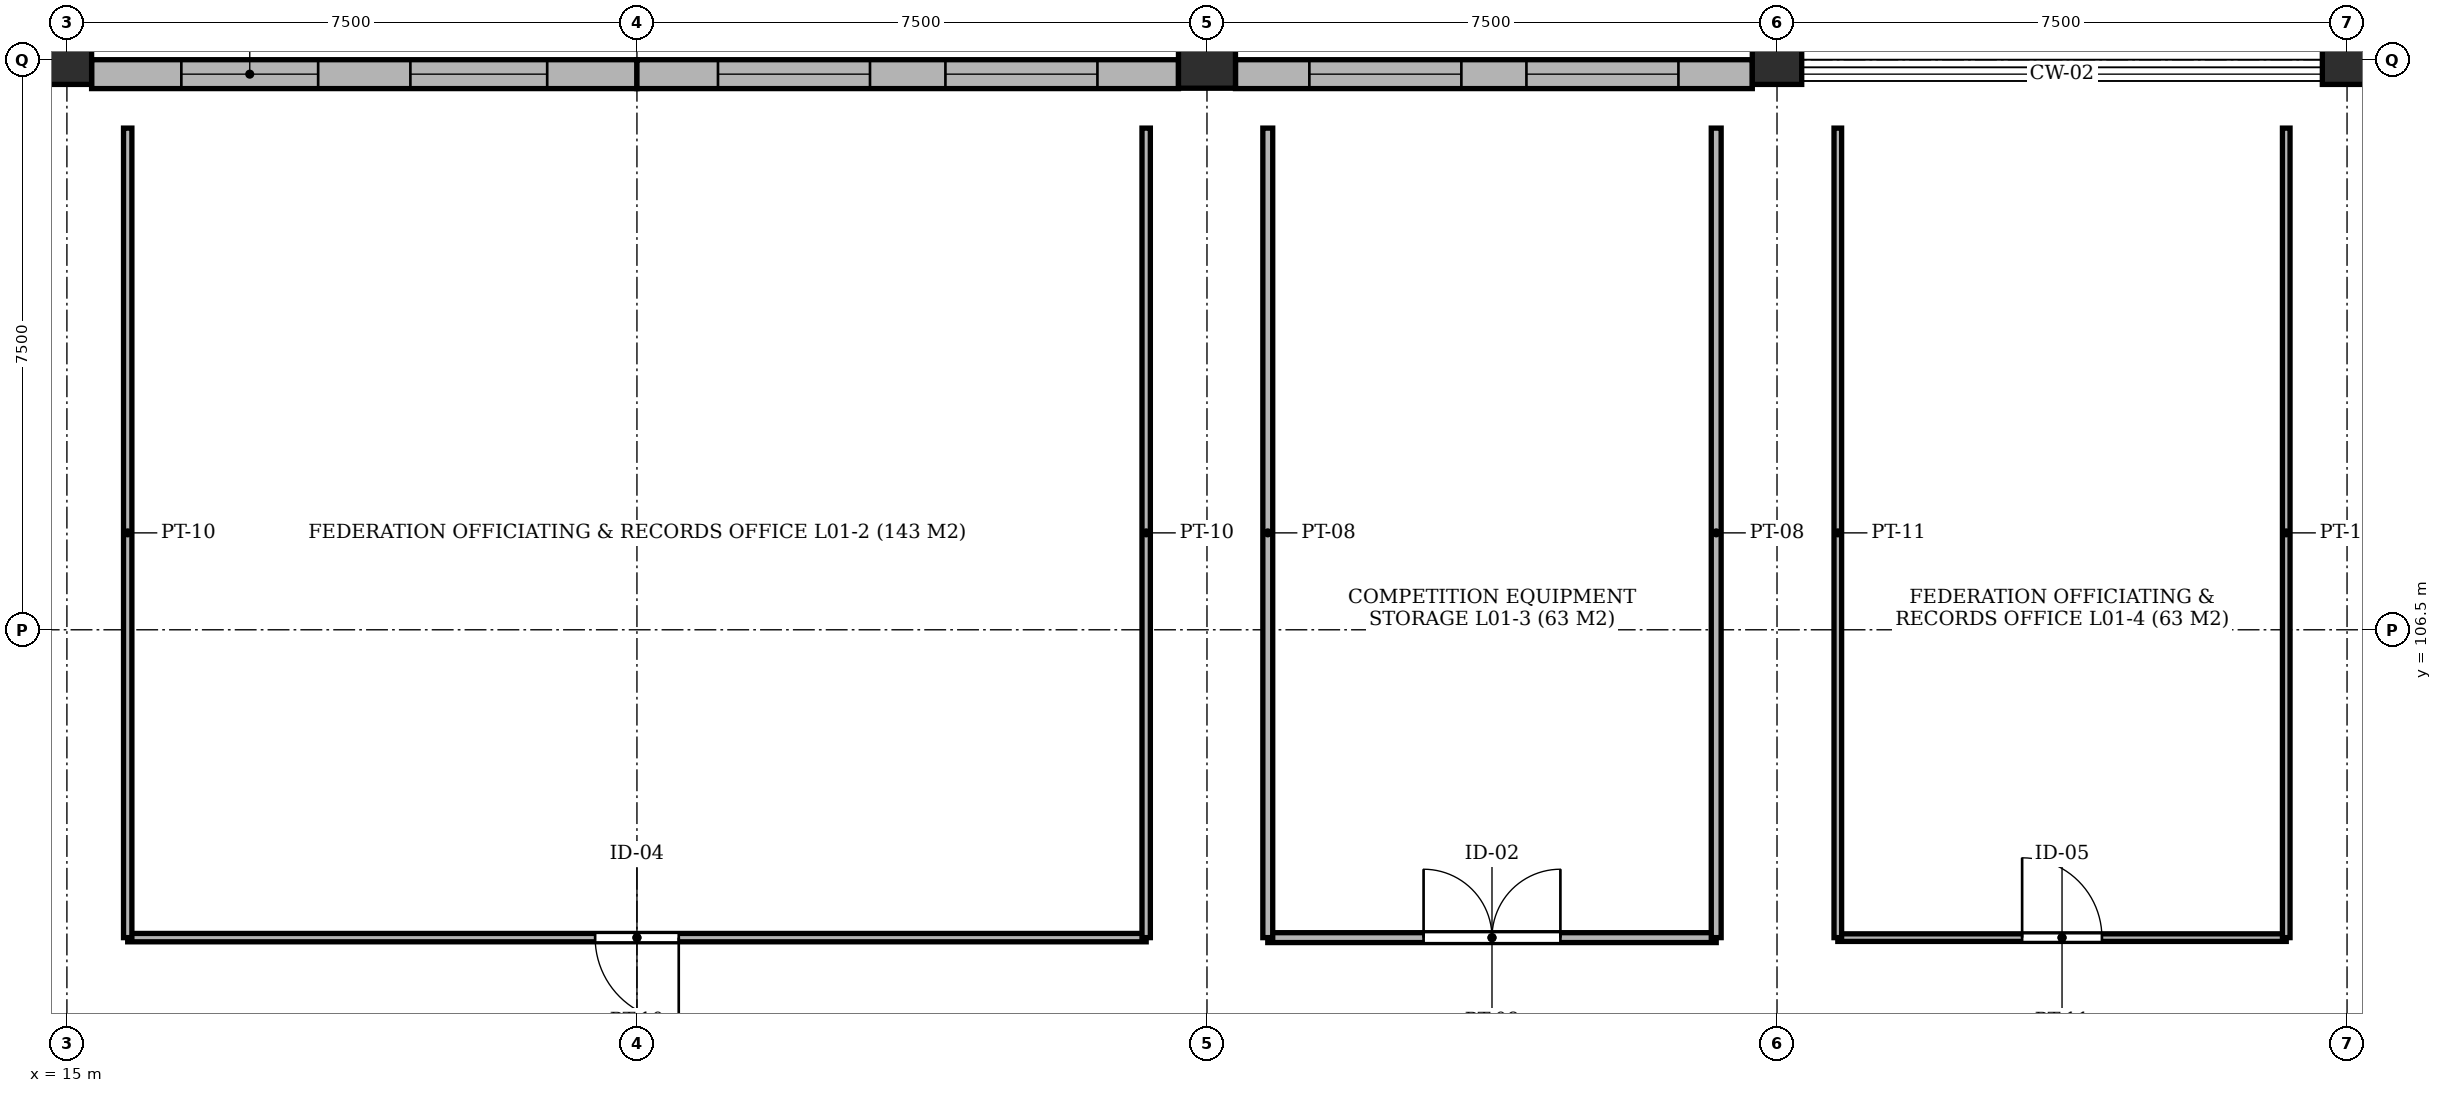
"""IFC4 building model, lengths in metres.
Left out: names, types, materials, properties, quantities, classifications, styles, units other than length and angle.
Written with IfcOpenShell. Run it as: python <this file> out.ifc"""

import sys

from ifc_helpers import new_model, si_unit, direction, frame, frame_2d, origin, origin_2d, place, context, subcontext, project, spatial, rectangle, extrude, element, fill, save


model = new_model("IFC4")
c1 = context("Model", 3, precision=1e-05, world=origin(), true_north=direction((0.0, 1.0)))
c2 = subcontext(c1, "Body", "Model", "MODEL_VIEW")
j1 = project(units=[si_unit("LENGTHUNIT", "METRE"), si_unit("PLANEANGLEUNIT", "RADIAN")], contexts=[c1])
p1 = place(None, origin())
s1 = spatial("IfcSite", under=j1, at=p1, CompositionType="ELEMENT")
p2 = place(p1, origin())
s2 = spatial("IfcBuilding", under=s1, at=p2, CompositionType="ELEMENT")
p3 = place(p2, frame((0.0, 0.0, 4.6)))
s3 = spatial("IfcBuildingStorey", under=s2, at=p3, CompositionType="ELEMENT", Elevation=4.6)
p4 = place(p3, frame((15.0, 114.0, -0.3), z_axis=(0.0, 0.0, 1.0), x_axis=(1.0, 0.0, 0.0)))
e1 = element("IfcColumn", 1, at=p4, inside=s3, PredefinedType="COLUMN", context=c2, shape_type="SweptSolid", body=[
    extrude(rectangle(XDim=0.65, YDim=0.65, at=origin_2d()), origin(), (0.0, 0.0, 1.0), 4.65),
])
p5 = place(p3, frame((30.0, 114.0, -0.3), z_axis=(0.0, 0.0, 1.0), x_axis=(1.0, 0.0, 0.0)))
e2 = element("IfcColumn", 2, at=p5, inside=s3, PredefinedType="COLUMN", context=c2, shape_type="SweptSolid", body=[
    extrude(rectangle(XDim=0.75, YDim=0.75, at=origin_2d()), origin(), (0.0, 0.0, 1.0), 4.65),
])
for number, where, z_axis, x_axis in (
    (3, (37.5, 114.0, -0.3), (0.0, 0.0, 1.0), (1.0, 0.0, 0.0)),
    (4, (45.0, 114.0, -0.3), (0.0, 0.0, 1.0), (1.0, 0.0, 0.0)),
):
    element("IfcColumn", number, at=place(p3, frame(where, z_axis=z_axis, x_axis=x_axis)), inside=s3, PredefinedType="COLUMN", context=c2, shape_type="SweptSolid", body=[
        extrude(rectangle(XDim=0.65, YDim=0.65, at=origin_2d()), origin(), (0.0, 0.0, 1.0), 4.65),
    ])
p6 = place(p3, frame((22.5, 113.81, 0.0), z_axis=(0.0, 0.0, 1.0), x_axis=(-1.0, 0.0, 0.0)))
e5 = element("IfcWall", 5, at=p6, inside=s3, PredefinedType="SOLIDWALL", context=c2, shape_type="SweptSolid", body=[
    extrude(rectangle(XDim=7.175, YDim=0.38, at=frame_2d((3.587, 0.0))), origin(), (0.0, 0.0, 1.0), 3.65),
])
p7 = place(p6, frame((4.194, 0.0, 0.92)))
e6 = element("IfcOpeningElement", 6, at=p7, cuts=e5, PredefinedType="OPENING", context=c2, shape_type="SweptSolid", body=[
    extrude(rectangle(XDim=1.8, YDim=2.3, at=frame_2d((0.9, 1.15))), frame((0.0, 0.202, 0.0), z_axis=(0.0, -1.0, 0.0), x_axis=(1.0, 0.0, 0.0)), (0.0, 0.0, 1.0), 0.404),
])
p8 = place(p6, frame((1.181, 0.0, 0.92)))
e7 = element("IfcOpeningElement", 7, at=p8, cuts=e5, PredefinedType="OPENING", context=c2, shape_type="SweptSolid", body=[
    extrude(rectangle(XDim=1.8, YDim=2.3, at=frame_2d((0.9, 1.15))), frame((0.0, 0.202, 0.0), z_axis=(0.0, -1.0, 0.0), x_axis=(1.0, 0.0, 0.0)), (0.0, 0.0, 1.0), 0.404),
])
p9 = place(p3, frame((29.625, 113.81, 0.0), z_axis=(0.0, 0.0, 1.0), x_axis=(-1.0, 0.0, 0.0)))
e8 = element("IfcWall", 8, at=p9, inside=s3, PredefinedType="SOLIDWALL", context=c2, shape_type="SweptSolid", body=[
    extrude(rectangle(XDim=7.125, YDim=0.38, at=frame_2d((3.562, 0.0))), origin(), (0.0, 0.0, 1.0), 3.65),
])
p10 = place(p9, frame((4.059, 0.0, 0.92)))
e9 = element("IfcOpeningElement", 9, at=p10, cuts=e8, PredefinedType="OPENING", context=c2, shape_type="SweptSolid", body=[
    extrude(rectangle(XDim=2.0, YDim=2.3, at=frame_2d((1.0, 1.15))), frame((0.0, 0.202, 0.0), z_axis=(0.0, -1.0, 0.0), x_axis=(1.0, 0.0, 0.0)), (0.0, 0.0, 1.0), 0.404),
])
p11 = place(p9, frame((1.066, 0.0, 0.92)))
e10 = element("IfcOpeningElement", 10, at=p11, cuts=e8, PredefinedType="OPENING", context=c2, shape_type="SweptSolid", body=[
    extrude(rectangle(XDim=2.0, YDim=2.3, at=frame_2d((1.0, 1.15))), frame((0.0, 0.202, 0.0), z_axis=(0.0, -1.0, 0.0), x_axis=(1.0, 0.0, 0.0)), (0.0, 0.0, 1.0), 0.404),
])
p12 = place(p3, frame((37.175, 113.81, 0.0), z_axis=(0.0, 0.0, 1.0), x_axis=(-1.0, 0.0, 0.0)))
e11 = element("IfcWall", 11, at=p12, inside=s3, PredefinedType="SOLIDWALL", context=c2, shape_type="SweptSolid", body=[
    extrude(rectangle(XDim=6.8, YDim=0.38, at=frame_2d((3.4, 0.0))), origin(), (0.0, 0.0, 1.0), 4.02),
])
p13 = place(p12, frame((3.828, 0.0, 0.92)))
e12 = element("IfcOpeningElement", 12, at=p13, cuts=e11, PredefinedType="OPENING", context=c2, shape_type="SweptSolid", body=[
    extrude(rectangle(XDim=2.0, YDim=2.3, at=frame_2d((1.0, 1.15))), frame((0.0, 0.202, 0.0), z_axis=(0.0, -1.0, 0.0), x_axis=(1.0, 0.0, 0.0)), (0.0, 0.0, 1.0), 0.404),
])
p14 = place(p12, frame((0.972, 0.0, 0.92)))
e13 = element("IfcOpeningElement", 13, at=p14, cuts=e11, PredefinedType="OPENING", context=c2, shape_type="SweptSolid", body=[
    extrude(rectangle(XDim=2.0, YDim=2.3, at=frame_2d((1.0, 1.15))), frame((0.0, 0.202, 0.0), z_axis=(0.0, -1.0, 0.0), x_axis=(1.0, 0.0, 0.0)), (0.0, 0.0, 1.0), 0.404),
])
p15 = place(p3, frame((15.8, 102.45, 0.0), z_axis=(0.0, 0.0, 1.0), x_axis=(1.0, 0.0, 0.0)))
e14 = element("IfcWall", 14, at=p15, inside=s3, PredefinedType="PARTITIONING", context=c2, shape_type="SweptSolid", body=[
    extrude(rectangle(XDim=13.4, YDim=0.11, at=frame_2d((6.7, 0.0))), origin(), (0.0, 0.0, 1.0), 4.08),
])
p16 = place(p15, frame((6.15, 0.0, 0.0)))
e15 = element("IfcOpeningElement", 15, at=p16, cuts=e14, PredefinedType="OPENING", context=c2, shape_type="SweptSolid", body=[
    extrude(rectangle(XDim=1.1, YDim=2.15, at=frame_2d((0.55, 1.075))), frame((0.0, 0.067, 0.0), z_axis=(0.0, -1.0, 0.0), x_axis=(1.0, 0.0, 0.0)), (0.0, 0.0, 1.0), 0.134),
])
for number, where, z_axis, x_axis in (
    (16, (15.8, 102.45, 0.0), (0.0, 0.0, 1.0), (0.0, 1.0, 0.0)),
    (17, (29.2, 102.45, 0.0), (0.0, 0.0, 1.0), (0.0, 1.0, 0.0)),
):
    element("IfcWall", number, at=place(p3, frame(where, z_axis=z_axis, x_axis=x_axis)), inside=s3, PredefinedType="PARTITIONING", context=c2, shape_type="SweptSolid", body=[
        extrude(rectangle(XDim=10.65, YDim=0.11, at=frame_2d((5.325, 0.0))), origin(), (0.0, 0.0, 1.0), 4.08),
    ])
p17 = place(p3, frame((30.8, 102.45, 0.0), z_axis=(0.0, 0.0, 1.0), x_axis=(1.0, 0.0, 0.0)))
e18 = element("IfcWall", 18, at=p17, inside=s3, PredefinedType="PARTITIONING", context=c2, shape_type="SweptSolid", body=[
    extrude(rectangle(XDim=5.9, YDim=0.13, at=frame_2d((2.95, 0.0))), origin(), (0.0, 0.0, 1.0), 4.08),
])
p18 = place(p17, frame((2.05, 0.0, 0.0)))
e19 = element("IfcOpeningElement", 19, at=p18, cuts=e18, PredefinedType="OPENING", context=c2, shape_type="SweptSolid", body=[
    extrude(rectangle(XDim=1.8, YDim=2.25, at=frame_2d((0.9, 1.125))), frame((0.0, 0.077, 0.0), z_axis=(0.0, -1.0, 0.0), x_axis=(1.0, 0.0, 0.0)), (0.0, 0.0, 1.0), 0.154),
])
for number, where, z_axis, x_axis in (
    (20, (30.8, 102.45, 0.0), (0.0, 0.0, 1.0), (0.0, 1.0, 0.0)),
    (21, (36.7, 102.45, 0.0), (0.0, 0.0, 1.0), (0.0, 1.0, 0.0)),
):
    element("IfcWall", number, at=place(p3, frame(where, z_axis=z_axis, x_axis=x_axis)), inside=s3, PredefinedType="PARTITIONING", context=c2, shape_type="SweptSolid", body=[
        extrude(rectangle(XDim=10.65, YDim=0.13, at=frame_2d((5.325, 0.0))), origin(), (0.0, 0.0, 1.0), 4.08),
    ])
p19 = place(p3, frame((38.3, 102.45, 0.0), z_axis=(0.0, 0.0, 1.0), x_axis=(1.0, 0.0, 0.0)))
e22 = element("IfcWall", 22, at=p19, inside=s3, PredefinedType="PARTITIONING", context=c2, shape_type="SweptSolid", body=[
    extrude(rectangle(XDim=5.9, YDim=0.1, at=frame_2d((2.95, 0.0))), origin(), (0.0, 0.0, 1.0), 4.08),
])
p20 = place(p19, frame((2.425, 0.0, 0.0)))
e23 = element("IfcOpeningElement", 23, at=p20, cuts=e22, PredefinedType="OPENING", context=c2, shape_type="SweptSolid", body=[
    extrude(rectangle(XDim=1.05, YDim=2.15, at=frame_2d((0.525, 1.075))), frame((0.0, 0.062, 0.0), z_axis=(0.0, -1.0, 0.0), x_axis=(1.0, 0.0, 0.0)), (0.0, 0.0, 1.0), 0.124),
])
for number, where, z_axis, x_axis in (
    (24, (38.3, 102.45, 0.0), (0.0, 0.0, 1.0), (0.0, 1.0, 0.0)),
    (25, (44.2, 102.45, 0.0), (0.0, 0.0, 1.0), (0.0, 1.0, 0.0)),
):
    element("IfcWall", number, at=place(p3, frame(where, z_axis=z_axis, x_axis=x_axis)), inside=s3, PredefinedType="PARTITIONING", context=c2, shape_type="SweptSolid", body=[
        extrude(rectangle(XDim=10.65, YDim=0.1, at=frame_2d((5.325, 0.0))), origin(), (0.0, 0.0, 1.0), 4.08),
    ])
p21 = place(p7, origin())
e26 = element("IfcWindow", 26, at=p21, inside=s3, PartitioningType="SINGLE_PANEL", PredefinedType="WINDOW", context=c2, shape_type="SweptSolid", body=[
    extrude(rectangle(XDim=1.8, YDim=2.3, at=frame_2d((0.9, 1.15))), frame((0.0, 0.03, 0.0), z_axis=(0.0, -1.0, 0.0), x_axis=(1.0, 0.0, 0.0)), (0.0, 0.0, 1.0), 0.06),
])
fill(e6, e26)
p22 = place(p8, origin())
e27 = element("IfcWindow", 27, at=p22, inside=s3, PartitioningType="SINGLE_PANEL", PredefinedType="WINDOW", context=c2, shape_type="SweptSolid", body=[
    extrude(rectangle(XDim=1.8, YDim=2.3, at=frame_2d((0.9, 1.15))), frame((0.0, 0.03, 0.0), z_axis=(0.0, -1.0, 0.0), x_axis=(1.0, 0.0, 0.0)), (0.0, 0.0, 1.0), 0.06),
])
fill(e7, e27)
p23 = place(p10, origin())
e28 = element("IfcWindow", 28, at=p23, inside=s3, PartitioningType="SINGLE_PANEL", PredefinedType="WINDOW", context=c2, shape_type="SweptSolid", body=[
    extrude(rectangle(XDim=2.0, YDim=2.3, at=frame_2d((1.0, 1.15))), frame((0.0, 0.03, 0.0), z_axis=(0.0, -1.0, 0.0), x_axis=(1.0, 0.0, 0.0)), (0.0, 0.0, 1.0), 0.06),
])
fill(e9, e28)
p24 = place(p11, origin())
e29 = element("IfcWindow", 29, at=p24, inside=s3, PartitioningType="SINGLE_PANEL", PredefinedType="WINDOW", context=c2, shape_type="SweptSolid", body=[
    extrude(rectangle(XDim=2.0, YDim=2.3, at=frame_2d((1.0, 1.15))), frame((0.0, 0.03, 0.0), z_axis=(0.0, -1.0, 0.0), x_axis=(1.0, 0.0, 0.0)), (0.0, 0.0, 1.0), 0.06),
])
fill(e10, e29)
p25 = place(p13, origin())
e30 = element("IfcWindow", 30, at=p25, inside=s3, PartitioningType="SINGLE_PANEL", PredefinedType="WINDOW", context=c2, shape_type="SweptSolid", body=[
    extrude(rectangle(XDim=2.0, YDim=2.3, at=frame_2d((1.0, 1.15))), frame((0.0, 0.03, 0.0), z_axis=(0.0, -1.0, 0.0), x_axis=(1.0, 0.0, 0.0)), (0.0, 0.0, 1.0), 0.06),
])
fill(e12, e30)
p26 = place(p14, origin())
e31 = element("IfcWindow", 31, at=p26, inside=s3, PartitioningType="SINGLE_PANEL", PredefinedType="WINDOW", context=c2, shape_type="SweptSolid", body=[
    extrude(rectangle(XDim=2.0, YDim=2.3, at=frame_2d((1.0, 1.15))), frame((0.0, 0.03, 0.0), z_axis=(0.0, -1.0, 0.0), x_axis=(1.0, 0.0, 0.0)), (0.0, 0.0, 1.0), 0.06),
])
fill(e13, e31)
p27 = place(p16, frame((1.1, 0.0, 0.0), z_axis=(0.0, 0.0, 1.0), x_axis=(-1.0, 0.0, 0.0)))
e32 = element("IfcDoor", 32, at=p27, inside=s3, OperationType="SINGLE_SWING_RIGHT", PredefinedType="DOOR", context=c2, shape_type="SweptSolid", body=[
    extrude(rectangle(XDim=1.1, YDim=2.15, at=frame_2d((0.55, 1.075))), frame((0.0, 0.025, 0.0), z_axis=(0.0, -1.0, 0.0), x_axis=(1.0, 0.0, 0.0)), (0.0, 0.0, 1.0), 0.05),
])
fill(e15, e32)
p28 = place(p18, origin())
e33 = element("IfcDoor", 33, at=p28, inside=s3, OperationType="DOUBLE_DOOR_SINGLE_SWING", PredefinedType="DOOR", context=c2, shape_type="SweptSolid", body=[
    extrude(rectangle(XDim=1.8, YDim=2.25, at=frame_2d((0.9, 1.125))), frame((0.0, 0.025, 0.0), z_axis=(0.0, -1.0, 0.0), x_axis=(1.0, 0.0, 0.0)), (0.0, 0.0, 1.0), 0.05),
])
fill(e19, e33)
p29 = place(p20, origin())
e34 = element("IfcDoor", 34, at=p29, inside=s3, OperationType="SINGLE_SWING_LEFT", PredefinedType="DOOR", context=c2, shape_type="SweptSolid", body=[
    extrude(rectangle(XDim=1.05, YDim=2.15, at=frame_2d((0.525, 1.075))), frame((0.0, 0.025, 0.0), z_axis=(0.0, -1.0, 0.0), x_axis=(1.0, 0.0, 0.0)), (0.0, 0.0, 1.0), 0.05),
])
fill(e23, e34)
save(model, sys.argv[1])
